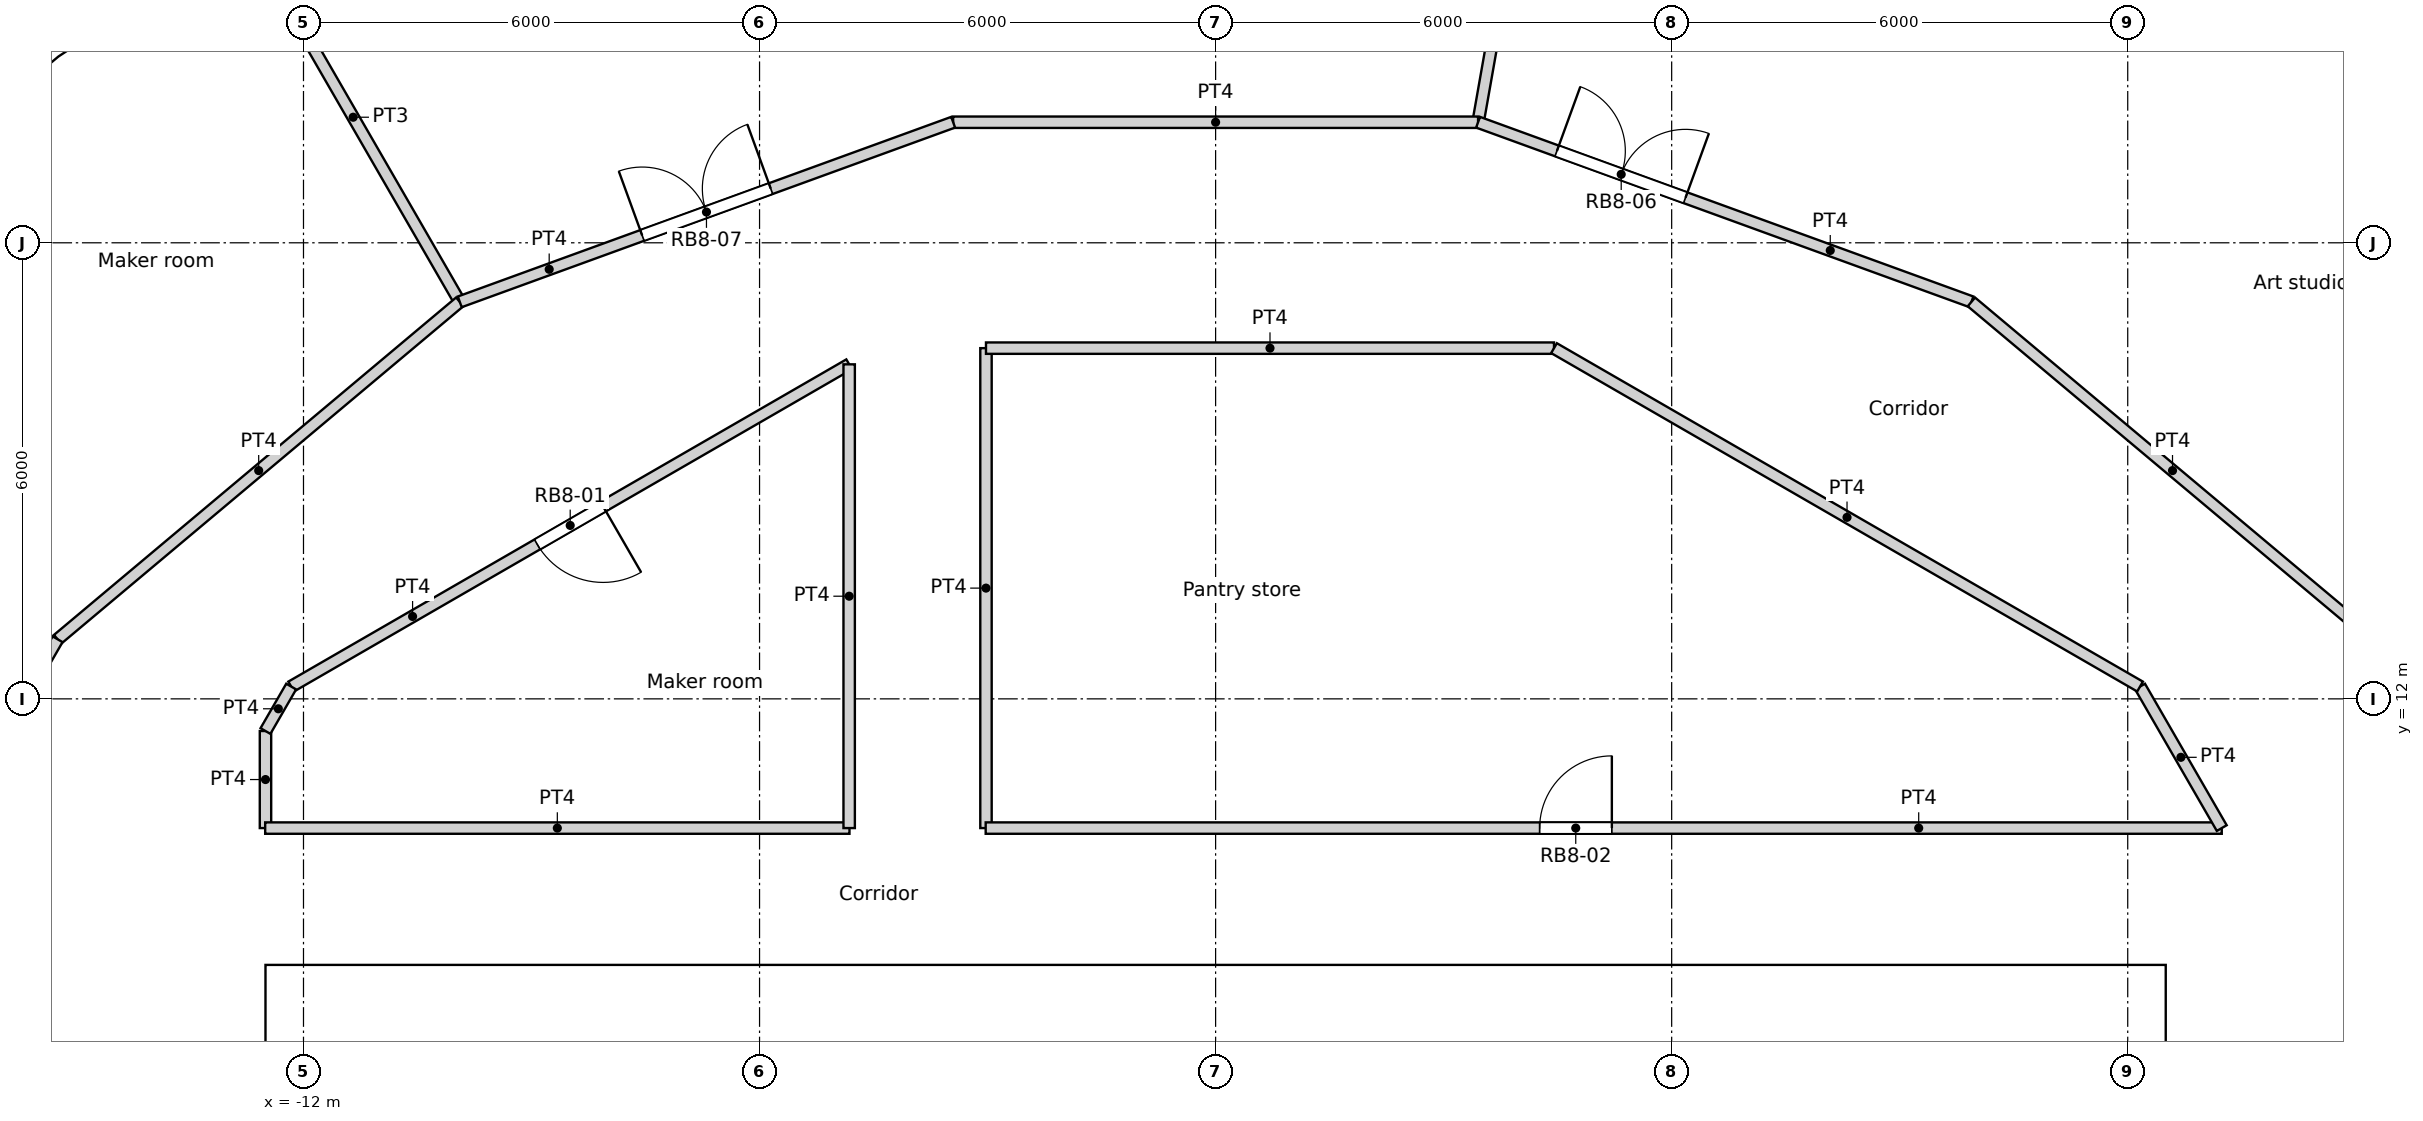
"""IFC4 building model, lengths in metres.
Left out: names, types, materials, properties, quantities, classifications, styles, units other than length and angle.
Written with IfcOpenShell. Run it as: python <this file> out.ifc"""

import sys

from ifc_helpers import new_model, si_unit, direction, frame, frame_2d, origin, origin_2d, place, context, subcontext, project, spatial, rectangle, circle, extrude, element, fill, save


model = new_model("IFC4")
c1 = context("Model", 3, precision=1e-05, world=origin(), true_north=direction((0.0, 1.0)))
c2 = subcontext(c1, "Body", "Model", "MODEL_VIEW")
j1 = project(units=[si_unit("LENGTHUNIT", "METRE"), si_unit("PLANEANGLEUNIT", "RADIAN")], contexts=[c1])
p1 = place(None, origin())
s1 = spatial("IfcSite", under=j1, at=p1, CompositionType="ELEMENT")
p2 = place(p1, origin())
s2 = spatial("IfcBuilding", under=s1, at=p2, CompositionType="ELEMENT")
p3 = place(p2, frame((0.0, 0.0, 201.6)))
s3 = spatial("IfcBuildingStorey", under=s2, at=p3, CompositionType="ELEMENT", Elevation=201.6)
p4 = place(p3, frame((14.659, 19.69, 0.0), z_axis=(0.0, 0.0, 1.0), x_axis=(1.0, 0.0, 0.0)))
e1 = element("IfcColumn", 1, at=p4, inside=s3, PredefinedType="COLUMN", context=c2, shape_type="SweptSolid", body=[
    extrude(circle(Radius=0.6, at=origin_2d()), origin(), (0.0, 0.0, 1.0), 3.6),
])
for number, where, z_axis, x_axis in (
    (2, (11.735, 14.716, 0.0), (0.0, 0.0, 1.0), (1.0, 0.0, 0.0)),
    (3, (6.876, 17.521, 0.0), (0.0, 0.0, 1.0), (1.0, 0.0, 0.0)),
    (4, (1.406, 18.77, 0.0), (0.0, 0.0, 1.0), (1.0, 0.0, 0.0)),
    (5, (-4.188, 18.35, 0.0), (0.0, 0.0, 1.0), (1.0, 0.0, 0.0)),
    (6, (-9.411, 16.301, 0.0), (0.0, 0.0, 1.0), (1.0, 0.0, 0.0)),
    (7, (-13.798, 12.802, 0.0), (0.0, 0.0, 1.0), (1.0, 0.0, 0.0)),
):
    element("IfcColumn", number, at=place(p3, frame(where, z_axis=z_axis, x_axis=x_axis)), inside=s3, PredefinedType="COLUMN", context=c2, shape_type="SweptSolid", body=[
        extrude(circle(Radius=0.65, at=origin_2d()), origin(), (0.0, 0.0, 1.0), 3.6),
    ])
p5 = place(p3, frame((15.316, 20.573, 0.0), z_axis=(0.0, 0.0, 1.0), x_axis=(-0.835508361394, 0.54947773207, 0.0)))
e8 = element("IfcWall", 8, at=p5, inside=s3, PredefinedType="SOLIDWALL", context=c2, shape_type="SweptSolid", body=[
    extrude(rectangle(XDim=2.973, YDim=0.3, at=frame_2d((1.486, 0.0))), origin(), (0.0, 0.0, 1.0), 3.3),
])
p6 = place(p5, frame((1.486, 0.0, 1.55)))
e9 = element("IfcOpeningElement", 9, at=p6, cuts=e8, PredefinedType="OPENING", context=c2, shape_type="SweptSolid", body=[
    extrude(circle(Radius=0.9, at=origin_2d()), frame((0.0, 0.16, 0.0), z_axis=(0.0, -1.0, 0.0), x_axis=(1.0, 0.0, 0.0)), (0.0, 0.0, 1.0), 0.32),
])
p7 = place(p3, frame((-13.132, 22.697, -0.3), z_axis=(0.0, 0.0, 1.0), x_axis=(-0.835514416706, -0.549468524554, 0.0)))
e10 = element("IfcWall", 10, at=p7, inside=s3, PredefinedType="ELEMENTEDWALL", context=c2, shape_type="SweptSolid", body=[
    extrude(rectangle(XDim=3.0, YDim=1.45, at=frame_2d((1.5, 0.0))), origin(), (0.0, 0.0, 1.0), 3.6),
])
p8 = place(p7, frame((1.5, 0.0, 1.85)))
e11 = element("IfcOpeningElement", 11, at=p8, cuts=e10, PredefinedType="OPENING", context=c2, shape_type="SweptSolid", body=[
    extrude(circle(Radius=0.9, at=origin_2d()), frame((0.0, 0.735, 0.0), z_axis=(0.0, -1.0, 0.0), x_axis=(1.0, 0.0, 0.0)), (0.0, 0.0, 1.0), 1.47),
])
p9 = place(p3, frame((-15.323, 20.566, 0.0), z_axis=(0.0, 0.0, 1.0), x_axis=(-0.766049350637, -0.642781761089, 0.0)))
e12 = element("IfcWall", 12, at=p9, inside=s3, PredefinedType="SOLIDWALL", context=c2, shape_type="SweptSolid", body=[
    extrude(rectangle(XDim=2.973, YDim=0.3, at=frame_2d((1.486, 0.0))), origin(), (0.0, 0.0, 1.0), 3.3),
])
p10 = place(p9, frame((1.486, 0.0, 1.55)))
e13 = element("IfcOpeningElement", 13, at=p10, cuts=e12, PredefinedType="OPENING", context=c2, shape_type="SweptSolid", body=[
    extrude(circle(Radius=0.9, at=origin_2d()), frame((0.0, 0.16, 0.0), z_axis=(0.0, -1.0, 0.0), x_axis=(1.0, 0.0, 0.0)), (0.0, 0.0, 1.0), 0.32),
])
p11 = place(p3, frame((-12.5, 8.05, 0.0), z_axis=(0.0, 0.0, 1.0), x_axis=(1.0, 0.0, 0.0)))
e14 = element("IfcWall", 14, at=p11, inside=s3, PredefinedType="SOLIDWALL", context=c2, shape_type="SweptSolid", body=[
    extrude(rectangle(XDim=25.0, YDim=0.9, at=frame_2d((12.5, 0.0))), origin(), (0.0, 0.0, 1.0), 3.6),
])
p12 = place(p11, frame((8.3, 0.0, 0.0)))
e15 = element("IfcOpeningElement", 15, at=p12, cuts=e14, PredefinedType="OPENING", context=c2, shape_type="SweptSolid", body=[
    extrude(rectangle(XDim=1.8, YDim=2.1, at=frame_2d((0.9, 1.05))), frame((0.0, 0.45, 0.0), z_axis=(0.0, -1.0, 0.0), x_axis=(1.0, 0.0, 0.0)), (0.0, 0.0, 1.0), 0.9),
])
p13 = place(p3, frame((-12.05, -7.6, 0.0), z_axis=(0.0, 0.0, 1.0), x_axis=(0.0, 1.0, 0.0)))
e16 = element("IfcWall", 16, at=p13, inside=s3, PredefinedType="SOLIDWALL", context=c2, shape_type="SweptSolid", body=[
    extrude(rectangle(XDim=15.2, YDim=0.9, at=frame_2d((7.6, 0.0))), origin(), (0.0, 0.0, 1.0), 3.6),
])
p14 = place(p13, frame((7.1, 0.0, 0.0)))
e17 = element("IfcOpeningElement", 17, at=p14, cuts=e16, PredefinedType="OPENING", context=c2, shape_type="SweptSolid", body=[
    extrude(rectangle(XDim=1.0, YDim=2.1, at=frame_2d((0.5, 1.05))), frame((0.0, 0.45, 0.0), z_axis=(0.0, -1.0, 0.0), x_axis=(1.0, 0.0, 0.0)), (0.0, 0.0, 1.0), 0.9),
])
p15 = place(p3, frame((12.05, -7.6, 0.0), z_axis=(0.0, 0.0, 1.0), x_axis=(0.0, 1.0, 0.0)))
e18 = element("IfcWall", 18, at=p15, inside=s3, PredefinedType="SOLIDWALL", context=c2, shape_type="SweptSolid", body=[
    extrude(rectangle(XDim=15.2, YDim=0.9, at=frame_2d((7.6, 0.0))), origin(), (0.0, 0.0, 1.0), 3.6),
])
p16 = place(p15, frame((5.1, 0.0, 0.0)))
e19 = element("IfcOpeningElement", 19, at=p16, cuts=e18, PredefinedType="OPENING", context=c2, shape_type="SweptSolid", body=[
    extrude(rectangle(XDim=1.0, YDim=2.1, at=frame_2d((0.5, 1.05))), frame((0.0, 0.45, 0.0), z_axis=(0.0, -1.0, 0.0), x_axis=(1.0, 0.0, 0.0)), (0.0, 0.0, 1.0), 0.9),
])
for number, where, z_axis, x_axis in (
    (20, (-2.25, 3.25, 0.0), (0.0, 0.0, 1.0), (0.0, 1.0, 0.0)),
    (21, (0.55, 3.25, 0.0), (0.0, 0.0, 1.0), (0.0, 1.0, 0.0)),
):
    element("IfcWall", number, at=place(p3, frame(where, z_axis=z_axis, x_axis=x_axis)), inside=s3, PredefinedType="SOLIDWALL", context=c2, shape_type="SweptSolid", body=[
        extrude(rectangle(XDim=4.35, YDim=0.3, at=frame_2d((2.175, 0.0))), origin(), (0.0, 0.0, 1.0), 3.3),
    ])
p17 = place(p3, frame((-9.05, -7.0, 0.0), z_axis=(0.0, 0.0, 1.0), x_axis=(0.0, 1.0, 0.0)))
e22 = element("IfcWall", 22, at=p17, inside=s3, PredefinedType="SOLIDWALL", context=c2, shape_type="SweptSolid", body=[
    extrude(rectangle(XDim=14.6, YDim=0.3, at=frame_2d((7.3, 0.0))), origin(), (0.0, 0.0, 1.0), 3.3),
])
p18 = place(p3, frame((-4.275, 6.7, 0.0), z_axis=(0.0, 0.0, 1.0), x_axis=(0.0, 1.0, 0.0)))
e23 = element("IfcWall", 23, at=p18, inside=s3, PredefinedType="SOLIDWALL", context=c2, shape_type="SweptSolid", body=[
    extrude(rectangle(XDim=0.9, YDim=0.15, at=frame_2d((0.45, 0.0))), origin(), (0.0, 0.0, 1.0), 3.3),
])
p19 = place(p3, frame((0.7, 7.15, 0.0), z_axis=(0.0, 0.0, 1.0), x_axis=(1.0, 0.0, 0.0)))
e24 = element("IfcWall", 24, at=p19, inside=s3, PredefinedType="SOLIDWALL", context=c2, shape_type="SweptSolid", body=[
    extrude(rectangle(XDim=8.35, YDim=0.9, at=frame_2d((4.175, 0.0))), origin(), (0.0, 0.0, 1.0), 3.3),
])
p20 = place(p3, frame((-12.504, 10.3, 0.0), z_axis=(0.0, 0.0, 1.0), x_axis=(1.0, 0.0, 0.0)))
e25 = element("IfcWall", 25, at=p20, inside=s3, PredefinedType="PARTITIONING", context=c2, shape_type="SweptSolid", body=[
    extrude(rectangle(XDim=7.687, YDim=0.15, at=frame_2d((3.844, 0.0))), origin(), (0.0, 0.0, 1.0), 3.3),
])
p21 = place(p3, frame((-3.025, 10.3, 0.0), z_axis=(0.0, 0.0, 1.0), x_axis=(1.0, 0.0, 0.0)))
e26 = element("IfcWall", 26, at=p21, inside=s3, PredefinedType="PARTITIONING", context=c2, shape_type="SweptSolid", body=[
    extrude(rectangle(XDim=16.262, YDim=0.15, at=frame_2d((8.131, 0.0))), origin(), (0.0, 0.0, 1.0), 3.3),
])
p22 = place(p21, frame((7.288, 0.0, 0.0)))
e27 = element("IfcOpeningElement", 27, at=p22, cuts=e26, PredefinedType="OPENING", context=c2, shape_type="SweptSolid", body=[
    extrude(rectangle(XDim=0.95, YDim=2.1, at=frame_2d((0.475, 1.05))), frame((0.0, 0.075, 0.0), z_axis=(0.0, -1.0, 0.0), x_axis=(1.0, 0.0, 0.0)), (0.0, 0.0, 1.0), 0.15),
])
p23 = place(p3, frame((12.162, 12.162, 0.0), z_axis=(0.0, 0.0, 1.0), x_axis=(0.499961633463, -0.866047553582, 0.0)))
e28 = element("IfcWall", 28, at=p23, inside=s3, PredefinedType="PARTITIONING", context=c2, shape_type="SweptSolid", body=[
    extrude(rectangle(XDim=2.15, YDim=0.15, at=frame_2d((1.075, 0.0))), origin(), (0.0, 0.0, 1.0), 3.3),
])
p24 = place(p3, frame((9.943, 17.222, 0.0), z_axis=(0.0, 0.0, 1.0), x_axis=(0.766192104565, -0.642611592567, 0.0)))
e29 = element("IfcWall", 29, at=p24, inside=s3, PredefinedType="PARTITIONING", context=c2, shape_type="SweptSolid", body=[
    extrude(rectangle(XDim=6.906, YDim=0.15, at=frame_2d((3.453, 0.0))), origin(), (0.0, 0.0, 1.0), 3.3),
])
p25 = place(p3, frame((-4.821, 10.3, 0.0), z_axis=(0.0, 0.0, 1.0), x_axis=(0.0, 1.0, 0.0)))
e30 = element("IfcWall", 30, at=p25, inside=s3, PredefinedType="PARTITIONING", context=c2, shape_type="SweptSolid", body=[
    extrude(rectangle(XDim=6.101, YDim=0.15, at=frame_2d((3.05, 0.0))), origin(), (0.0, 0.0, 1.0), 3.3),
])
p26 = place(p3, frame((-12.162, 12.162, 0.0), z_axis=(0.0, 0.0, 1.0), x_axis=(0.866004766557, 0.500035743023, 0.0)))
e31 = element("IfcWall", 31, at=p26, inside=s3, PredefinedType="PARTITIONING", context=c2, shape_type="SweptSolid", body=[
    extrude(rectangle(XDim=8.477, YDim=0.15, at=frame_2d((4.239, 0.0))), origin(), (0.0, 0.0, 1.0), 3.3),
])
p27 = place(p26, frame((3.739, 0.0, 0.0)))
e32 = element("IfcOpeningElement", 32, at=p27, cuts=e31, PredefinedType="OPENING", context=c2, shape_type="SweptSolid", body=[
    extrude(rectangle(XDim=1.0, YDim=2.04, at=frame_2d((0.5, 1.02))), frame((0.0, 0.075, 0.0), z_axis=(0.0, -1.0, 0.0), x_axis=(1.0, 0.0, 0.0)), (0.0, 0.0, 1.0), 0.15),
])
p28 = place(p3, frame((4.452, 16.614, 0.0), z_axis=(0.0, 0.0, 1.0), x_axis=(0.866005203721, -0.500034985904, 0.0)))
e33 = element("IfcWall", 33, at=p28, inside=s3, PredefinedType="PARTITIONING", context=c2, shape_type="SweptSolid", body=[
    extrude(rectangle(XDim=8.903, YDim=0.15, at=frame_2d((4.452, 0.0))), origin(), (0.0, 0.0, 1.0), 3.3),
])
p29 = place(p3, frame((-3.021, 16.614, 0.0), z_axis=(0.0, 0.0, 1.0), x_axis=(1.0, 0.0, 0.0)))
e34 = element("IfcWall", 34, at=p29, inside=s3, PredefinedType="PARTITIONING", context=c2, shape_type="SweptSolid", body=[
    extrude(rectangle(XDim=7.473, YDim=0.15, at=frame_2d((3.736, 0.0))), origin(), (0.0, 0.0, 1.0), 3.3),
])
p30 = place(p3, frame((-3.021, 10.3, 0.0), z_axis=(0.0, 0.0, 1.0), x_axis=(0.0, 1.0, 0.0)))
e35 = element("IfcWall", 35, at=p30, inside=s3, PredefinedType="PARTITIONING", context=c2, shape_type="SweptSolid", body=[
    extrude(rectangle(XDim=6.314, YDim=0.15, at=frame_2d((3.157, 0.0))), origin(), (0.0, 0.0, 1.0), 3.3),
])
p31 = place(p3, frame((3.453, 19.586, 0.0), z_axis=(0.0, 0.0, 1.0), x_axis=(0.939672634566, -0.342075050021, 0.0)))
e36 = element("IfcWall", 36, at=p31, inside=s3, PredefinedType="PARTITIONING", context=c2, shape_type="SweptSolid", body=[
    extrude(rectangle(XDim=6.908, YDim=0.15, at=frame_2d((3.454, 0.0))), origin(), (0.0, 0.0, 1.0), 3.3),
])
p32 = place(p31, frame((1.104, 0.0, 0.0)))
e37 = element("IfcOpeningElement", 37, at=p32, cuts=e36, PredefinedType="OPENING", context=c2, shape_type="SweptSolid", body=[
    extrude(rectangle(XDim=1.8, YDim=2.1, at=frame_2d((0.9, 1.05))), frame((0.0, 0.075, 0.0), z_axis=(0.0, -1.0, 0.0), x_axis=(1.0, 0.0, 0.0)), (0.0, 0.0, 1.0), 0.15),
])
p33 = place(p3, frame((-9.944, 17.223, 0.0), z_axis=(0.0, 0.0, 1.0), x_axis=(0.939672634566, 0.342075050021, 0.0)))
e38 = element("IfcWall", 38, at=p33, inside=s3, PredefinedType="PARTITIONING", context=c2, shape_type="SweptSolid", body=[
    extrude(rectangle(XDim=6.908, YDim=0.15, at=frame_2d((3.454, 0.0))), origin(), (0.0, 0.0, 1.0), 3.3),
])
p34 = place(p33, frame((2.554, 0.0, 0.0)))
e39 = element("IfcOpeningElement", 39, at=p34, cuts=e38, PredefinedType="OPENING", context=c2, shape_type="SweptSolid", body=[
    extrude(rectangle(XDim=1.8, YDim=2.1, at=frame_2d((0.9, 1.05))), frame((0.0, 0.075, 0.0), z_axis=(0.0, -1.0, 0.0), x_axis=(1.0, 0.0, 0.0)), (0.0, 0.0, 1.0), 0.15),
])
p35 = place(p3, frame((-3.453, 19.586, 0.0), z_axis=(0.0, 0.0, 1.0), x_axis=(1.0, 0.0, 0.0)))
e40 = element("IfcWall", 40, at=p35, inside=s3, PredefinedType="PARTITIONING", context=c2, shape_type="SweptSolid", body=[
    extrude(rectangle(XDim=6.906, YDim=0.15, at=frame_2d((3.453, 0.0))), origin(), (0.0, 0.0, 1.0), 3.3),
])
p36 = place(p3, frame((-15.235, 12.784, 0.0), z_axis=(0.0, 0.0, 1.0), x_axis=(0.766064078986, 0.642764207845, 0.0)))
e41 = element("IfcWall", 41, at=p36, inside=s3, PredefinedType="PARTITIONING", context=c2, shape_type="SweptSolid", body=[
    extrude(rectangle(XDim=6.906, YDim=0.15, at=frame_2d((3.453, 0.0))), origin(), (0.0, 0.0, 1.0), 3.3),
])
p37 = place(p3, frame((-12.5, 11.577, 0.0), z_axis=(0.0, 0.0, 1.0), x_axis=(0.500024767483, 0.866011103799, 0.0)))
e42 = element("IfcWall", 42, at=p37, inside=s3, PredefinedType="PARTITIONING", context=c2, shape_type="SweptSolid", body=[
    extrude(rectangle(XDim=0.676, YDim=0.15, at=frame_2d((0.338, 0.0))), origin(), (0.0, 0.0, 1.0), 3.3),
])
p38 = place(p3, frame((-12.5, 10.3, 0.0), z_axis=(0.0, 0.0, 1.0), x_axis=(0.0, 1.0, 0.0)))
e43 = element("IfcWall", 43, at=p38, inside=s3, PredefinedType="PARTITIONING", context=c2, shape_type="SweptSolid", body=[
    extrude(rectangle(XDim=1.277, YDim=0.15, at=frame_2d((0.638, 0.0))), origin(), (0.0, 0.0, 1.0), 3.3),
])
p39 = place(p3, frame((-18.688, 6.802, 0.0), z_axis=(0.0, 0.0, 1.0), x_axis=(0.499914202267, 0.866074933462, 0.0)))
e44 = element("IfcWall", 44, at=p39, inside=s3, PredefinedType="PARTITIONING", context=c2, shape_type="SweptSolid", body=[
    extrude(rectangle(XDim=6.907, YDim=0.15, at=frame_2d((3.454, 0.0))), origin(), (0.0, 0.0, 1.0), 3.3),
])
p40 = place(p39, frame((3.004, 0.0, 0.0)))
e45 = element("IfcOpeningElement", 45, at=p40, cuts=e44, PredefinedType="OPENING", context=c2, shape_type="SweptSolid", body=[
    extrude(rectangle(XDim=1.8, YDim=2.1, at=frame_2d((0.9, 1.05))), frame((0.0, 0.075, 0.0), z_axis=(0.0, -1.0, 0.0), x_axis=(1.0, 0.0, 0.0)), (0.0, 0.0, 1.0), 0.15),
])
p41 = place(p3, frame((3.453, 19.586, 0.0), z_axis=(0.0, 0.0, 1.0), x_axis=(0.17382754149, 0.984776109489, 0.0)))
e46 = element("IfcWall", 46, at=p41, inside=s3, PredefinedType="PARTITIONING", context=c2, shape_type="SweptSolid", body=[
    extrude(rectangle(XDim=5.61, YDim=0.15, at=frame_2d((2.805, 0.0))), origin(), (0.0, 0.0, 1.0), 3.3),
])
p42 = place(p3, frame((-12.749, 22.081, 0.0), z_axis=(0.0, 0.0, 1.0), x_axis=(0.500010020406, -0.866019618423, 0.0)))
e47 = element("IfcWall", 47, at=p42, inside=s3, PredefinedType="PARTITIONING", context=c2, shape_type="SweptSolid", body=[
    extrude(rectangle(XDim=5.61, YDim=0.15, at=frame_2d((2.805, 0.0))), origin(), (0.0, 0.0, 1.0), 3.3),
])
p43 = place(p12, origin())
e48 = element("IfcDoor", 48, at=p43, inside=s3, OperationType="DOUBLE_DOOR_SINGLE_SWING", PredefinedType="DOOR", context=c2, shape_type="SweptSolid", body=[
    extrude(rectangle(XDim=1.8, YDim=2.1, at=frame_2d((0.9, 1.05))), frame((0.0, 0.025, 0.0), z_axis=(0.0, -1.0, 0.0), x_axis=(1.0, 0.0, 0.0)), (0.0, 0.0, 1.0), 0.05),
])
fill(e15, e48)
p44 = place(p27, origin())
e49 = element("IfcDoor", 49, at=p44, inside=s3, OperationType="SINGLE_SWING_LEFT", PredefinedType="DOOR", context=c2, shape_type="SweptSolid", body=[
    extrude(rectangle(XDim=1.0, YDim=2.04, at=frame_2d((0.5, 1.02))), frame((0.0, 0.025, 0.0), z_axis=(0.0, -1.0, 0.0), x_axis=(1.0, 0.0, 0.0)), (0.0, 0.0, 1.0), 0.05),
])
fill(e32, e49)
p45 = place(p22, origin())
e50 = element("IfcDoor", 50, at=p45, inside=s3, OperationType="SINGLE_SWING_RIGHT", PredefinedType="DOOR", context=c2, shape_type="SweptSolid", body=[
    extrude(rectangle(XDim=0.95, YDim=2.1, at=frame_2d((0.475, 1.05))), frame((0.0, 0.025, 0.0), z_axis=(0.0, -1.0, 0.0), x_axis=(1.0, 0.0, 0.0)), (0.0, 0.0, 1.0), 0.05),
])
fill(e27, e50)
p46 = place(p32, origin())
e51 = element("IfcDoor", 51, at=p46, inside=s3, OperationType="DOUBLE_DOOR_SINGLE_SWING", PredefinedType="DOOR", context=c2, shape_type="SweptSolid", body=[
    extrude(rectangle(XDim=1.8, YDim=2.1, at=frame_2d((0.9, 1.05))), frame((0.0, 0.025, 0.0), z_axis=(0.0, -1.0, 0.0), x_axis=(1.0, 0.0, 0.0)), (0.0, 0.0, 1.0), 0.05),
])
fill(e37, e51)
p47 = place(p34, origin())
e52 = element("IfcDoor", 52, at=p47, inside=s3, OperationType="DOUBLE_DOOR_SINGLE_SWING", PredefinedType="DOOR", context=c2, shape_type="SweptSolid", body=[
    extrude(rectangle(XDim=1.8, YDim=2.1, at=frame_2d((0.9, 1.05))), frame((0.0, 0.025, 0.0), z_axis=(0.0, -1.0, 0.0), x_axis=(1.0, 0.0, 0.0)), (0.0, 0.0, 1.0), 0.05),
])
fill(e39, e52)
save(model, sys.argv[1])
